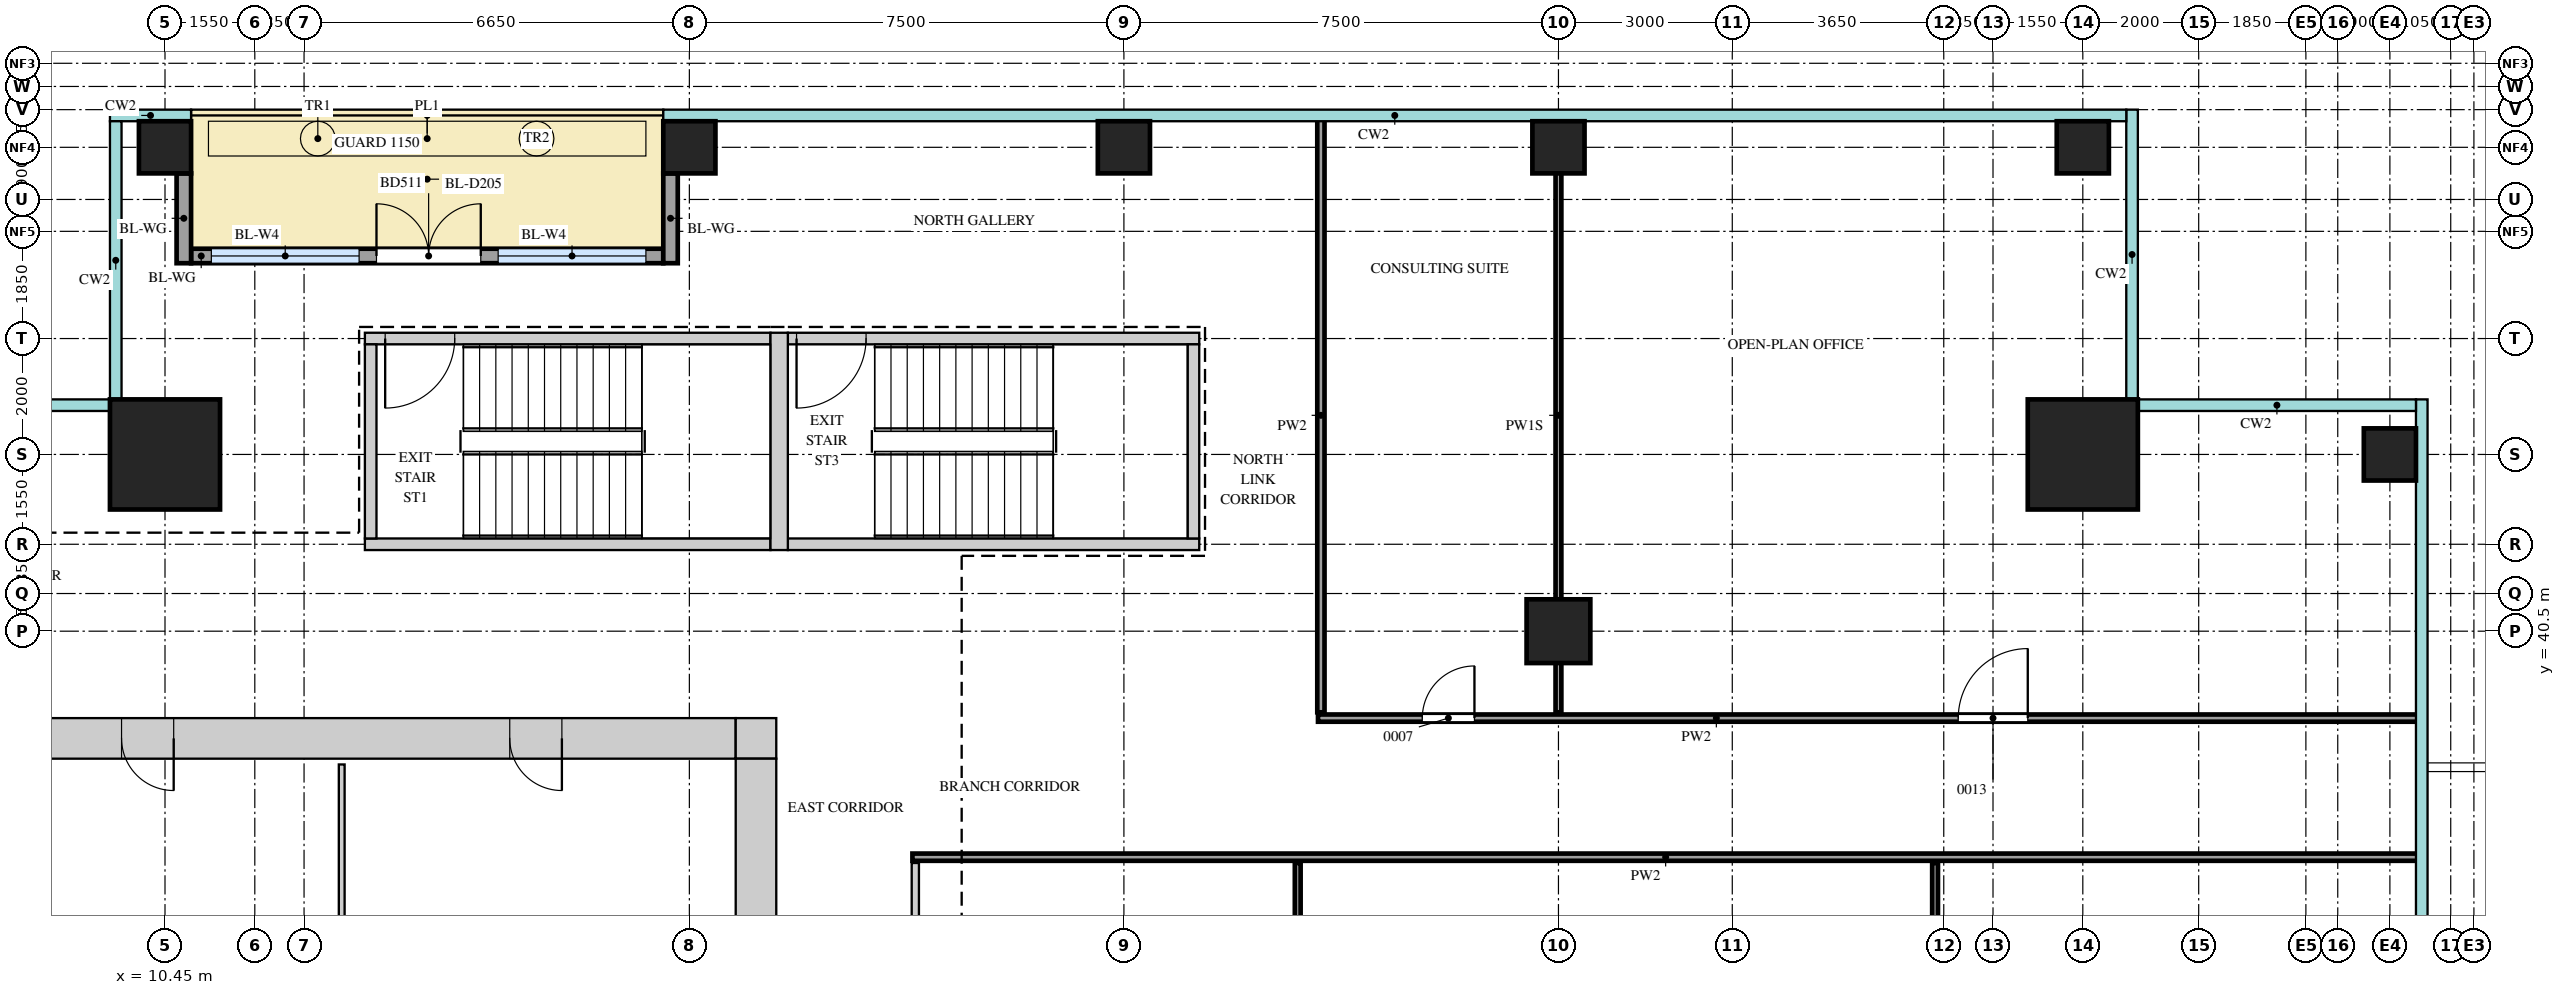
"""IFC4 building model, lengths in metres.
Left out: names, types, materials, properties, quantities, classifications, styles, units other than length and angle.
Written with IfcOpenShell. Run it as: python <this file> out.ifc"""

import sys

from ifc_helpers import new_model, si_unit, direction, frame, frame_2d, origin, origin_2d, place, context, subcontext, project, spatial, rectangle, extrude, source, transform, mapped, element, fill, save


model = new_model("IFC4")
c1 = context("Model", 3, precision=1e-05, world=origin(), true_north=direction((0.0, 1.0)))
c2 = subcontext(c1, "Body", "Model", "MODEL_VIEW")
j1 = project(units=[si_unit("LENGTHUNIT", "METRE"), si_unit("PLANEANGLEUNIT", "RADIAN")], contexts=[c1])
p1 = place(None, origin())
s1 = spatial("IfcSite", under=j1, at=p1, CompositionType="ELEMENT")
p2 = place(p1, origin())
s2 = spatial("IfcBuilding", under=s1, at=p2, CompositionType="ELEMENT")
p3 = place(p2, frame((0.0, 0.0, 230.2)))
s3 = spatial("IfcBuildingStorey", under=s2, at=p3, CompositionType="ELEMENT", Elevation=230.2)
m1 = source(origin(), c2, "Body", "SweptSolid", [
    extrude(rectangle(XDim=13.6, YDim=0.7, at=frame_2d((6.8, 0.0))), origin(), (0.0, 0.0, 1.0), 3.75),
])
p4 = place(p3, frame((6.7, 38.65, 0.0), z_axis=(0.0, 0.0, 1.0), x_axis=(1.0, 0.0, 0.0)))
e1 = element("IfcWall", 1, at=p4, inside=s3, PredefinedType="SHEAR", context=c2, shape_type="MappedRepresentation", body=[
    mapped(m1, transform((0.0, 0.0, 0.0))),
])
m2 = source(origin(), c2, "Body", "SweptSolid", [
    extrude(rectangle(XDim=0.9, YDim=2.1, at=frame_2d((0.45, 1.05))), frame((0.0, 0.36, 0.0), z_axis=(0.0, -1.0, 0.0), x_axis=(1.0, 0.0, 0.0)), (0.0, 0.0, 1.0), 0.72),
])
p5 = place(p4, frame((3.0, 0.0, 0.0)))
e2 = element("IfcOpeningElement", 2, at=p5, cuts=e1, PredefinedType="OPENING", context=c2, shape_type="MappedRepresentation", body=[
    mapped(m2, transform((0.0, 0.0, 0.0))),
])
p6 = place(p4, frame((9.7, 0.0, 0.0)))
e3 = element("IfcOpeningElement", 3, at=p6, cuts=e1, PredefinedType="OPENING", context=c2, shape_type="MappedRepresentation", body=[
    mapped(m2, transform((0.0, 0.0, 0.0))),
])
m3 = source(origin(), c2, "Body", "SweptSolid", [
    extrude(rectangle(XDim=0.7, YDim=0.7, at=frame_2d((0.35, 0.0))), origin(), (0.0, 0.0, 1.0), 3.75),
])
p7 = place(p3, frame((20.3, 38.65, 0.0), z_axis=(0.0, 0.0, 1.0), x_axis=(1.0, 0.0, 0.0)))
e4 = element("IfcWall", 4, at=p7, inside=s3, PredefinedType="SHEAR", context=c2, shape_type="MappedRepresentation", body=[
    mapped(m3, transform((0.0, 0.0, 0.0))),
])
m4 = source(origin(), c2, "Body", "SweptSolid", [
    extrude(rectangle(XDim=22.6, YDim=0.7, at=frame_2d((11.3, 0.0))), origin(), (0.0, 0.0, 1.0), 3.75),
])
p8 = place(p3, frame((20.65, 15.7, 0.0), z_axis=(0.0, 0.0, 1.0), x_axis=(0.0, 1.0, 0.0)))
e5 = element("IfcWall", 5, at=p8, inside=s3, PredefinedType="SHEAR", context=c2, shape_type="MappedRepresentation", body=[
    mapped(m4, transform((0.0, 0.0, 0.0))),
])
m5 = source(origin(), c2, "Body", "SweptSolid", [
    extrude(rectangle(XDim=1.8, YDim=2.1, at=frame_2d((0.9, 1.05))), frame((0.0, 0.36, 0.0), z_axis=(0.0, -1.0, 0.0), x_axis=(1.0, 0.0, 0.0)), (0.0, 0.0, 1.0), 0.72),
])
p9 = place(p8, frame((10.8, 0.0, 0.0)))
e6 = element("IfcOpeningElement", 6, at=p9, cuts=e5, PredefinedType="OPENING", context=c2, shape_type="MappedRepresentation", body=[
    mapped(m5, transform((0.0, 0.0, 0.0))),
])
p10 = place(p8, frame((0.45, 0.0, 0.0)))
e7 = element("IfcOpeningElement", 7, at=p10, cuts=e5, PredefinedType="OPENING", context=c2, shape_type="MappedRepresentation", body=[
    mapped(m2, transform((0.0, 0.0, 0.0))),
])
p11 = place(p8, frame((2.9, 0.0, 0.0)))
e8 = element("IfcOpeningElement", 8, at=p11, cuts=e5, PredefinedType="OPENING", context=c2, shape_type="MappedRepresentation", body=[
    mapped(m2, transform((0.0, 0.0, 0.0))),
])
p12 = place(p8, frame((5.65, 0.0, 0.0)))
e9 = element("IfcOpeningElement", 9, at=p12, cuts=e5, PredefinedType="OPENING", context=c2, shape_type="MappedRepresentation", body=[
    mapped(m2, transform((0.0, 0.0, 0.0))),
])
m6 = source(origin(), c2, "Body", "SweptSolid", [
    extrude(rectangle(XDim=7.0, YDim=0.2, at=frame_2d((3.5, 0.0))), origin(), (0.0, 0.0, 1.0), 3.75),
])
p13 = place(p3, frame((13.9, 45.55, 0.0), z_axis=(0.0, 0.0, 1.0), x_axis=(1.0, 0.0, 0.0)))
e10 = element("IfcWall", 10, at=p13, inside=s3, PredefinedType="SHEAR", context=c2, shape_type="MappedRepresentation", body=[
    mapped(m6, transform((0.0, 0.0, 0.0))),
])
m7 = source(origin(), c2, "Body", "SweptSolid", [
    extrude(rectangle(XDim=1.2, YDim=2.1, at=frame_2d((0.6, 1.05))), frame((0.0, 0.11, 0.0), z_axis=(0.0, -1.0, 0.0), x_axis=(1.0, 0.0, 0.0)), (0.0, 0.0, 1.0), 0.22),
])
p14 = place(p13, frame((0.35, 0.0, 0.0)))
e11 = element("IfcOpeningElement", 11, at=p14, cuts=e10, PredefinedType="OPENING", context=c2, shape_type="MappedRepresentation", body=[
    mapped(m7, transform((0.0, 0.0, 0.0))),
])
p15 = place(p3, frame((13.9, 42.0, 0.0), z_axis=(0.0, 0.0, 1.0), x_axis=(1.0, 0.0, 0.0)))
e12 = element("IfcWall", 12, at=p15, inside=s3, PredefinedType="SHEAR", context=c2, shape_type="MappedRepresentation", body=[
    mapped(m6, transform((0.0, 0.0, 0.0))),
])
m8 = source(origin(), c2, "Body", "SweptSolid", [
    extrude(rectangle(XDim=7.1, YDim=0.2, at=frame_2d((3.55, 0.0))), origin(), (0.0, 0.0, 1.0), 3.75),
])
p16 = place(p3, frame((21.2, 45.55, 0.0), z_axis=(0.0, 0.0, 1.0), x_axis=(1.0, 0.0, 0.0)))
e13 = element("IfcWall", 13, at=p16, inside=s3, PredefinedType="SHEAR", context=c2, shape_type="MappedRepresentation", body=[
    mapped(m8, transform((0.0, 0.0, 0.0))),
])
p17 = place(p16, frame((0.15, 0.0, 0.0)))
e14 = element("IfcOpeningElement", 14, at=p17, cuts=e13, PredefinedType="OPENING", context=c2, shape_type="MappedRepresentation", body=[
    mapped(m7, transform((0.0, 0.0, 0.0))),
])
p18 = place(p3, frame((21.2, 42.0, 0.0), z_axis=(0.0, 0.0, 1.0), x_axis=(1.0, 0.0, 0.0)))
e15 = element("IfcWall", 15, at=p18, inside=s3, PredefinedType="SHEAR", context=c2, shape_type="MappedRepresentation", body=[
    mapped(m8, transform((0.0, 0.0, 0.0))),
])
m9 = source(origin(), c2, "Body", "SweptSolid", [
    extrude(rectangle(XDim=3.75, YDim=0.3, at=frame_2d((1.875, 0.0))), origin(), (0.0, 0.0, 1.0), 3.75),
])
p19 = place(p3, frame((21.05, 41.9, 0.0), z_axis=(0.0, 0.0, 1.0), x_axis=(0.0, 1.0, 0.0)))
e16 = element("IfcWall", 16, at=p19, inside=s3, PredefinedType="SHEAR", context=c2, shape_type="MappedRepresentation", body=[
    mapped(m9, transform((0.0, 0.0, 0.0))),
])
m10 = source(origin(), c2, "Body", "SweptSolid", [
    extrude(rectangle(XDim=3.35, YDim=0.2, at=frame_2d((1.675, 0.0))), origin(), (0.0, 0.0, 1.0), 3.75),
])
for number, where, z_axis, x_axis in (
    (17, (14.0, 42.1, 0.0), (0.0, 0.0, 1.0), (0.0, 1.0, 0.0)),
    (18, (28.2, 42.1, 0.0), (0.0, 0.0, 1.0), (0.0, 1.0, 0.0)),
):
    element("IfcWall", number, at=place(p3, frame(where, z_axis=z_axis, x_axis=x_axis)), inside=s3, PredefinedType="SHEAR", context=c2, shape_type="MappedRepresentation", body=[
        mapped(m10, transform((0.0, 0.0, 0.0))),
    ])
m11 = source(origin(), c2, "Body", "SweptSolid", [
    extrude(rectangle(XDim=1.9, YDim=1.9, at=origin_2d()), origin(), (0.0, 0.0, 1.0), 4.0),
])
for number, where, z_axis, x_axis in (
    (19, (43.55, 43.55, 0.0), (0.0, 0.0, 1.0), (1.0, 0.0, 0.0)),
    (20, (10.45, 43.55, 0.0), (0.0, 0.0, 1.0), (1.0, 0.0, 0.0)),
):
    element("IfcColumn", number, at=place(p3, frame(where, z_axis=z_axis, x_axis=x_axis)), inside=s3, PredefinedType="COLUMN", context=c2, shape_type="MappedRepresentation", body=[
        mapped(m11, transform((0.0, 0.0, 0.0))),
    ])
m12 = source(origin(), c2, "Body", "SweptSolid", [
    extrude(rectangle(XDim=0.9, YDim=0.9, at=origin_2d()), origin(), (0.0, 0.0, 1.0), 3.75),
])
for number, where, z_axis, x_axis in (
    (21, (48.85, 43.55, 0.0), (0.0, 0.0, 1.0), (1.0, 0.0, 0.0)),
    (22, (10.45, 48.85, 0.0), (0.0, 0.0, 1.0), (1.0, 0.0, 0.0)),
    (23, (19.5, 48.85, 0.0), (0.0, 0.0, 1.0), (1.0, 0.0, 0.0)),
    (24, (27.0, 48.85, 0.0), (0.0, 0.0, 1.0), (1.0, 0.0, 0.0)),
    (25, (34.5, 48.85, 0.0), (0.0, 0.0, 1.0), (1.0, 0.0, 0.0)),
    (26, (43.55, 48.85, 0.0), (0.0, 0.0, 1.0), (1.0, 0.0, 0.0)),
):
    element("IfcColumn", number, at=place(p3, frame(where, z_axis=z_axis, x_axis=x_axis)), inside=s3, PredefinedType="COLUMN", context=c2, shape_type="MappedRepresentation", body=[
        mapped(m12, transform((0.0, 0.0, 0.0))),
    ])
m13 = source(origin(), c2, "Body", "SweptSolid", [
    extrude(rectangle(XDim=1.1, YDim=1.1, at=origin_2d()), origin(), (0.0, 0.0, 1.0), 3.75),
])
p20 = place(p3, frame((34.5, 40.5, 0.0), z_axis=(0.0, 0.0, 1.0), x_axis=(1.0, 0.0, 0.0)))
e27 = element("IfcColumn", 27, at=p20, inside=s3, PredefinedType="COLUMN", context=c2, shape_type="MappedRepresentation", body=[
    mapped(m13, transform((0.0, 0.0, 0.0))),
])
m14 = source(origin(), c2, "Body", "SweptSolid", [
    extrude(rectangle(XDim=8.15, YDim=0.25, at=frame_2d((4.075, 0.0))), origin(), (0.0, 0.0, 1.0), 3.35),
])
p21 = place(p3, frame((10.9, 46.975, 0.0), z_axis=(0.0, 0.0, 1.0), x_axis=(1.0, 0.0, 0.0)))
e28 = element("IfcWall", 28, at=p21, inside=s3, PredefinedType="SOLIDWALL", context=c2, shape_type="MappedRepresentation", body=[
    mapped(m14, transform((0.0, 0.0, 0.0))),
])
m15 = source(origin(), c2, "Body", "SweptSolid", [
    extrude(rectangle(XDim=2.55, YDim=2.4, at=frame_2d((1.275, 1.2))), frame((0.0, 0.135, 0.0), z_axis=(0.0, -1.0, 0.0), x_axis=(1.0, 0.0, 0.0)), (0.0, 0.0, 1.0), 0.27),
])
p22 = place(p21, frame((0.35, 0.0, 0.0)))
e29 = element("IfcOpeningElement", 29, at=p22, cuts=e28, PredefinedType="OPENING", context=c2, shape_type="MappedRepresentation", body=[
    mapped(m15, transform((0.0, 0.0, 0.0))),
])
p23 = place(p21, frame((5.3, 0.0, 0.0)))
e30 = element("IfcOpeningElement", 30, at=p23, cuts=e28, PredefinedType="OPENING", context=c2, shape_type="MappedRepresentation", body=[
    mapped(m15, transform((0.0, 0.0, 0.0))),
])
m16 = source(origin(), c2, "Body", "SweptSolid", [
    extrude(rectangle(XDim=1.8, YDim=2.4, at=frame_2d((0.9, 1.2))), frame((0.0, 0.135, 0.0), z_axis=(0.0, -1.0, 0.0), x_axis=(1.0, 0.0, 0.0)), (0.0, 0.0, 1.0), 0.27),
])
p24 = place(p21, frame((3.2, 0.0, 0.0)))
e31 = element("IfcOpeningElement", 31, at=p24, cuts=e28, PredefinedType="OPENING", context=c2, shape_type="MappedRepresentation", body=[
    mapped(m16, transform((0.0, 0.0, 0.0))),
])
m17 = source(origin(), c2, "Body", "SweptSolid", [
    extrude(rectangle(XDim=1.55, YDim=0.25, at=frame_2d((0.775, 0.0))), origin(), (0.0, 0.0, 1.0), 3.35),
])
for number, where, z_axis, x_axis in (
    (32, (10.775, 48.4, 0.0), (0.0, 0.0, 1.0), (0.0, -1.0, 0.0)),
    (33, (19.175, 48.4, 0.0), (0.0, 0.0, 1.0), (0.0, -1.0, 0.0)),
):
    element("IfcWall", number, at=place(p3, frame(where, z_axis=z_axis, x_axis=x_axis)), inside=s3, PredefinedType="SOLIDWALL", context=c2, shape_type="MappedRepresentation", body=[
        mapped(m17, transform((0.0, 0.0, 0.0))),
    ])
m18 = source(origin(), c2, "Body", "SweptSolid", [
    extrude(rectangle(XDim=18.4, YDim=0.125, at=frame_2d((9.2, 0.0))), origin(), (0.0, 0.0, 1.0), 3.8),
])
p25 = place(p3, frame((23.4, 18.1, 0.0), z_axis=(0.0, 0.0, 1.0), x_axis=(0.0, 1.0, 0.0)))
e34 = element("IfcWall", 34, at=p25, inside=s3, PredefinedType="PARTITIONING", context=c2, shape_type="MappedRepresentation", body=[
    mapped(m18, transform((0.0, 0.0, 0.0))),
])
m19 = source(origin(), c2, "Body", "SweptSolid", [
    extrude(rectangle(XDim=1.2, YDim=2.1, at=frame_2d((0.6, 1.05))), frame((0.0, 0.073, 0.0), z_axis=(0.0, -1.0, 0.0), x_axis=(1.0, 0.0, 0.0)), (0.0, 0.0, 1.0), 0.145),
])
p26 = place(p25, frame((8.6, 0.0, 0.0)))
e35 = element("IfcOpeningElement", 35, at=p26, cuts=e34, PredefinedType="OPENING", context=c2, shape_type="MappedRepresentation", body=[
    mapped(m19, transform((0.0, 0.0, 0.0))),
])
m20 = source(origin(), c2, "Body", "SweptSolid", [
    extrude(rectangle(XDim=18.4, YDim=0.1, at=frame_2d((9.2, 0.0))), origin(), (0.0, 0.0, 1.0), 3.8),
])
for number, where, z_axis, x_axis in (
    (36, (30.0, 18.1, 0.0), (0.0, 0.0, 1.0), (0.0, 1.0, 0.0)),
    (37, (41.0, 18.1, 0.0), (0.0, 0.0, 1.0), (0.0, 1.0, 0.0)),
):
    element("IfcWall", number, at=place(p3, frame(where, z_axis=z_axis, x_axis=x_axis)), inside=s3, PredefinedType="PARTITIONING", context=c2, shape_type="MappedRepresentation", body=[
        mapped(m20, transform((0.0, 0.0, 0.0))),
    ])
m21 = source(origin(), c2, "Body", "SweptSolid", [
    extrude(rectangle(XDim=6.0, YDim=0.1, at=frame_2d((3.0, 0.0))), origin(), (0.0, 0.0, 1.0), 3.8),
])
p27 = place(p3, frame((13.5, 32.2, 0.0), z_axis=(0.0, 0.0, 1.0), x_axis=(0.0, 1.0, 0.0)))
e38 = element("IfcWall", 38, at=p27, inside=s3, PredefinedType="PARTITIONING", context=c2, shape_type="MappedRepresentation", body=[
    mapped(m21, transform((0.0, 0.0, 0.0))),
])
m22 = source(origin(), c2, "Body", "SweptSolid", [
    extrude(rectangle(XDim=26.0, YDim=0.125, at=frame_2d((13.0, 0.0))), origin(), (0.0, 0.0, 1.0), 3.8),
])
p28 = place(p3, frame((23.35, 36.6, 0.0), z_axis=(0.0, 0.0, 1.0), x_axis=(1.0, 0.0, 0.0)))
e39 = element("IfcWall", 39, at=p28, inside=s3, PredefinedType="PARTITIONING", context=c2, shape_type="MappedRepresentation", body=[
    mapped(m22, transform((0.0, 0.0, 0.0))),
])
m23 = source(origin(), c2, "Body", "SweptSolid", [
    extrude(rectangle(XDim=19.0, YDim=0.125, at=frame_2d((9.5, 0.0))), origin(), (0.0, 0.0, 1.0), 3.8),
])
p29 = place(p3, frame((30.35, 39.0, 0.0), z_axis=(0.0, 0.0, 1.0), x_axis=(1.0, 0.0, 0.0)))
e40 = element("IfcWall", 40, at=p29, inside=s3, PredefinedType="PARTITIONING", context=c2, shape_type="MappedRepresentation", body=[
    mapped(m23, transform((0.0, 0.0, 0.0))),
])
m24 = source(origin(), c2, "Body", "SweptSolid", [
    extrude(rectangle(XDim=0.9, YDim=2.1, at=frame_2d((0.45, 1.05))), frame((0.0, 0.073, 0.0), z_axis=(0.0, -1.0, 0.0), x_axis=(1.0, 0.0, 0.0)), (0.0, 0.0, 1.0), 0.145),
])
p30 = place(p29, frame((1.8, 0.0, 0.0)))
e41 = element("IfcOpeningElement", 41, at=p30, cuts=e40, PredefinedType="OPENING", context=c2, shape_type="MappedRepresentation", body=[
    mapped(m24, transform((0.0, 0.0, 0.0))),
])
p31 = place(p29, frame((11.05, 0.0, 0.0)))
e42 = element("IfcOpeningElement", 42, at=p31, cuts=e40, PredefinedType="OPENING", context=c2, shape_type="MappedRepresentation", body=[
    mapped(m19, transform((0.0, 0.0, 0.0))),
])
m25 = source(origin(), c2, "Body", "SweptSolid", [
    extrude(rectangle(XDim=10.25, YDim=0.125, at=frame_2d((5.125, 0.0))), origin(), (0.0, 0.0, 1.0), 3.8),
])
p32 = place(p3, frame((30.4, 39.1, 0.0), z_axis=(0.0, 0.0, 1.0), x_axis=(0.0, 1.0, 0.0)))
e43 = element("IfcWall", 43, at=p32, inside=s3, PredefinedType="PARTITIONING", context=c2, shape_type="MappedRepresentation", body=[
    mapped(m25, transform((0.0, 0.0, 0.0))),
])
m26 = source(origin(), c2, "Body", "SweptSolid", [
    extrude(rectangle(XDim=10.25, YDim=0.1, at=frame_2d((5.125, 0.0))), origin(), (0.0, 0.0, 1.0), 3.35),
])
p33 = place(p3, frame((34.5, 39.1, 0.0), z_axis=(0.0, 0.0, 1.0), x_axis=(0.0, 1.0, 0.0)))
e44 = element("IfcWall", 44, at=p33, inside=s3, PredefinedType="PARTITIONING", context=c2, shape_type="MappedRepresentation", body=[
    mapped(m26, transform((0.0, 0.0, 0.0))),
])
m27 = source(origin(), c2, "Body", "SweptSolid", [
    extrude(rectangle(XDim=2.55, YDim=2.4, at=frame_2d((1.275, 1.2))), frame((0.0, 0.03, 0.0), z_axis=(0.0, -1.0, 0.0), x_axis=(1.0, 0.0, 0.0)), (0.0, 0.0, 1.0), 0.06),
])
p34 = place(p22, origin())
e45 = element("IfcWindow", 45, at=p34, inside=s3, PartitioningType="SINGLE_PANEL", PredefinedType="WINDOW", context=c2, shape_type="MappedRepresentation", body=[
    mapped(m27, transform((0.0, 0.0, 0.0))),
])
fill(e29, e45)
p35 = place(p23, origin())
e46 = element("IfcWindow", 46, at=p35, inside=s3, PartitioningType="SINGLE_PANEL", PredefinedType="WINDOW", context=c2, shape_type="MappedRepresentation", body=[
    mapped(m27, transform((0.0, 0.0, 0.0))),
])
fill(e30, e46)
m28 = source(origin(), c2, "Body", "SweptSolid", [
    extrude(rectangle(XDim=1.8, YDim=2.4, at=frame_2d((0.9, 1.2))), frame((0.0, 0.025, 0.0), z_axis=(0.0, -1.0, 0.0), x_axis=(1.0, 0.0, 0.0)), (0.0, 0.0, 1.0), 0.05),
])
p36 = place(p24, origin())
e47 = element("IfcDoor", 47, at=p36, inside=s3, OperationType="DOUBLE_DOOR_DOUBLE_SWING", PredefinedType="DOOR", context=c2, shape_type="MappedRepresentation", body=[
    mapped(m28, transform((0.0, 0.0, 0.0))),
])
fill(e31, e47)
m29 = source(origin(), c2, "Body", "SweptSolid", [
    extrude(rectangle(XDim=0.9, YDim=2.1, at=frame_2d((0.45, 1.05))), frame((0.0, 0.3, 0.0), z_axis=(0.0, -1.0, 0.0), x_axis=(1.0, 0.0, 0.0)), (0.0, 0.0, 1.0), 0.6),
])
p37 = place(p5, origin())
e48 = element("IfcDoor", 48, at=p37, inside=s3, OperationType="SINGLE_SWING_RIGHT", PredefinedType="DOOR", context=c2, shape_type="MappedRepresentation", body=[
    mapped(m29, transform((0.0, 0.0, 0.0))),
])
fill(e2, e48)
p38 = place(p6, origin())
e49 = element("IfcDoor", 49, at=p38, inside=s3, OperationType="SINGLE_SWING_RIGHT", PredefinedType="DOOR", context=c2, shape_type="MappedRepresentation", body=[
    mapped(m29, transform((0.0, 0.0, 0.0))),
])
fill(e3, e49)
m30 = source(origin(), c2, "Body", "SweptSolid", [
    extrude(rectangle(XDim=0.9, YDim=2.1, at=frame_2d((0.45, 1.05))), frame((0.0, 0.025, 0.0), z_axis=(0.0, -1.0, 0.0), x_axis=(1.0, 0.0, 0.0)), (0.0, 0.0, 1.0), 0.05),
])
p39 = place(p30, origin())
e50 = element("IfcDoor", 50, at=p39, inside=s3, OperationType="SINGLE_SWING_LEFT", PredefinedType="DOOR", context=c2, shape_type="MappedRepresentation", body=[
    mapped(m30, transform((0.0, 0.0, 0.0))),
])
fill(e41, e50)
m31 = source(origin(), c2, "Body", "SweptSolid", [
    extrude(rectangle(XDim=1.2, YDim=2.1, at=frame_2d((0.6, 1.05))), frame((0.0, 0.025, 0.0), z_axis=(0.0, -1.0, 0.0), x_axis=(1.0, 0.0, 0.0)), (0.0, 0.0, 1.0), 0.05),
])
p40 = place(p31, origin())
e51 = element("IfcDoor", 51, at=p40, inside=s3, OperationType="SINGLE_SWING_LEFT", PredefinedType="DOOR", context=c2, shape_type="MappedRepresentation", body=[
    mapped(m31, transform((0.0, 0.0, 0.0))),
])
fill(e42, e51)
p41 = place(p14, origin())
e52 = element("IfcDoor", 52, at=p41, inside=s3, OperationType="SINGLE_SWING_LEFT", PredefinedType="DOOR", context=c2, shape_type="MappedRepresentation", body=[
    mapped(m31, transform((0.0, 0.0, 0.0))),
])
fill(e11, e52)
p42 = place(p17, origin())
e53 = element("IfcDoor", 53, at=p42, inside=s3, OperationType="SINGLE_SWING_LEFT", PredefinedType="DOOR", context=c2, shape_type="MappedRepresentation", body=[
    mapped(m31, transform((0.0, 0.0, 0.0))),
])
fill(e14, e53)
save(model, sys.argv[1])
